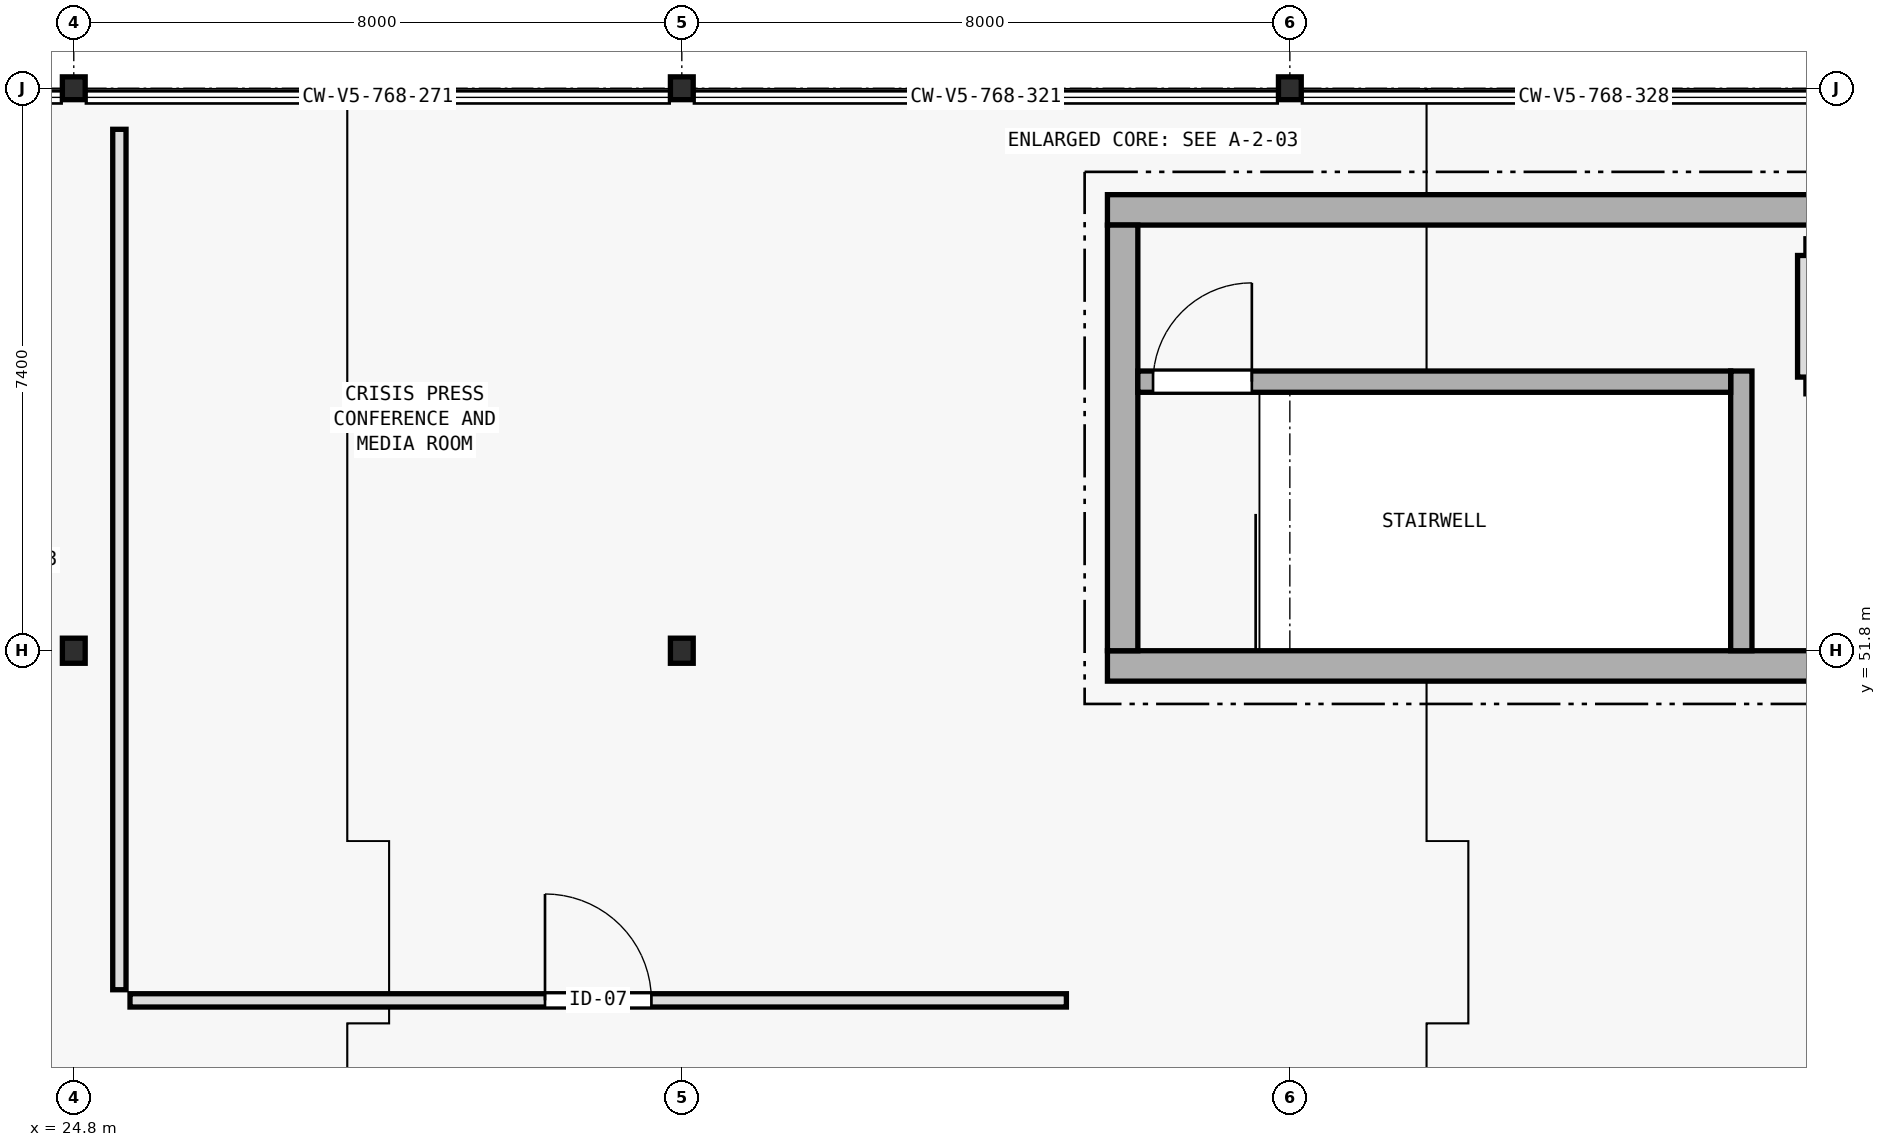
"""IFC4 building model, lengths in metres.
Left out: names, types, materials, properties, quantities, classifications, styles, units other than length and angle.
Written with IfcOpenShell. Run it as: python <this file> out.ifc"""

import sys

from ifc_helpers import new_model, si_unit, direction, frame, frame_2d, origin, origin_2d, place, context, subcontext, project, spatial, rectangle, i_section, extrude, element, fill, save


model = new_model("IFC4")
c1 = context("Model", 3, precision=1e-05, world=origin(), true_north=direction((0.0, 1.0)))
c2 = subcontext(c1, "Body", "Model", "MODEL_VIEW")
j1 = project(units=[si_unit("LENGTHUNIT", "METRE"), si_unit("PLANEANGLEUNIT", "RADIAN")], contexts=[c1])
p1 = place(None, origin())
s1 = spatial("IfcSite", under=j1, at=p1, CompositionType="ELEMENT")
p2 = place(p1, origin())
s2 = spatial("IfcBuilding", under=s1, at=p2, CompositionType="ELEMENT")
p3 = place(p2, frame((0.0, 0.0, 31.1)))
s3 = spatial("IfcBuildingStorey", under=s2, at=p3, CompositionType="ELEMENT", Elevation=31.1)
p4 = place(p3, frame((38.4, 51.6, 0.0), z_axis=(0.0, 0.0, 1.0), x_axis=(1.0, 0.0, 0.0)))
e1 = element("IfcWall", 1, at=p4, inside=s3, PredefinedType="SHEAR", context=c2, shape_type="SweptSolid", body=[
    extrude(rectangle(XDim=15.2, YDim=0.4, at=frame_2d((7.6, 0.0))), origin(), (0.0, 0.0, 1.0), 3.895),
])
p5 = place(p4, frame((10.25, 0.0, 0.0)))
e2 = element("IfcOpeningElement", 2, at=p5, cuts=e1, PredefinedType="OPENING", context=c2, shape_type="SweptSolid", body=[
    extrude(rectangle(XDim=1.3, YDim=2.2, at=frame_2d((0.65, 1.1))), frame((0.0, 0.21, 0.0), z_axis=(0.0, -1.0, 0.0), x_axis=(1.0, 0.0, 0.0)), (0.0, 0.0, 1.0), 0.42),
])
p6 = place(p3, frame((38.4, 57.6, 0.0), z_axis=(0.0, 0.0, 1.0), x_axis=(1.0, 0.0, 0.0)))
e3 = element("IfcWall", 3, at=p6, inside=s3, PredefinedType="SHEAR", context=c2, shape_type="SweptSolid", body=[
    extrude(rectangle(XDim=15.2, YDim=0.4, at=frame_2d((7.6, 0.0))), origin(), (0.0, 0.0, 1.0), 3.895),
])
p7 = place(p3, frame((38.6, 51.8, 0.0), z_axis=(0.0, 0.0, 1.0), x_axis=(0.0, 1.0, 0.0)))
e4 = element("IfcWall", 4, at=p7, inside=s3, PredefinedType="SHEAR", context=c2, shape_type="SweptSolid", body=[
    extrude(rectangle(XDim=5.6, YDim=0.4, at=frame_2d((2.8, 0.0))), origin(), (0.0, 0.0, 1.0), 3.895),
])
p8 = place(p3, frame((46.74, 51.8, 0.0), z_axis=(0.0, 0.0, 1.0), x_axis=(0.0, 1.0, 0.0)))
e5 = element("IfcWall", 5, at=p8, inside=s3, PredefinedType="SHEAR", context=c2, shape_type="SweptSolid", body=[
    extrude(rectangle(XDim=3.68, YDim=0.28, at=frame_2d((1.84, 0.0))), origin(), (0.0, 0.0, 1.0), 3.895),
])
p9 = place(p3, frame((38.8, 55.34, 0.0), z_axis=(0.0, 0.0, 1.0), x_axis=(1.0, 0.0, 0.0)))
e6 = element("IfcWall", 6, at=p9, inside=s3, PredefinedType="SHEAR", context=c2, shape_type="SweptSolid", body=[
    extrude(rectangle(XDim=7.8, YDim=0.28, at=frame_2d((3.9, 0.0))), origin(), (0.0, 0.0, 1.0), 3.895),
])
p10 = place(p9, frame((0.2, 0.0, 0.0)))
e7 = element("IfcOpeningElement", 7, at=p10, cuts=e6, PredefinedType="OPENING", context=c2, shape_type="SweptSolid", body=[
    extrude(rectangle(XDim=1.3, YDim=2.2, at=frame_2d((0.65, 1.1))), frame((0.0, 0.15, 0.0), z_axis=(0.0, -1.0, 0.0), x_axis=(1.0, 0.0, 0.0)), (0.0, 0.0, 1.0), 0.3),
])
p11 = place(p3, frame((24.8, 51.8, 0.0), z_axis=(0.0, 0.0, 1.0), x_axis=(1.0, 0.0, 0.0)))
e8 = element("IfcColumn", 8, at=p11, inside=s3, PredefinedType="COLUMN", context=c2, shape_type="SweptSolid", body=[
    extrude(i_section(OverallWidth=0.3, OverallDepth=0.33, WebThickness=0.01, FlangeThickness=0.017, FilletRadius=0.027, at=origin_2d()), origin(), (0.0, 0.0, 1.0), 3.9),
])
p12 = place(p3, frame((24.8, 59.2, 0.0), z_axis=(0.0, 0.0, 1.0), x_axis=(1.0, 0.0, 0.0)))
e9 = element("IfcColumn", 9, at=p12, inside=s3, PredefinedType="COLUMN", context=c2, shape_type="SweptSolid", body=[
    extrude(i_section(OverallWidth=0.3, OverallDepth=0.3, WebThickness=0.011, FlangeThickness=0.019, FilletRadius=0.027, at=origin_2d()), origin(), (0.0, 0.0, 1.0), 3.9),
])
p13 = place(p3, frame((32.8, 51.8, 0.0), z_axis=(0.0, 0.0, 1.0), x_axis=(1.0, 0.0, 0.0)))
e10 = element("IfcColumn", 10, at=p13, inside=s3, PredefinedType="COLUMN", context=c2, shape_type="SweptSolid", body=[
    extrude(i_section(OverallWidth=0.3, OverallDepth=0.33, WebThickness=0.01, FlangeThickness=0.017, FilletRadius=0.027, at=origin_2d()), origin(), (0.0, 0.0, 1.0), 3.9),
])
for number, where, z_axis, x_axis in (
    (11, (32.8, 59.2, 0.0), (0.0, 0.0, 1.0), (1.0, 0.0, 0.0)),
    (12, (40.8, 59.2, 0.0), (0.0, 0.0, 1.0), (1.0, 0.0, 0.0)),
):
    element("IfcColumn", number, at=place(p3, frame(where, z_axis=z_axis, x_axis=x_axis)), inside=s3, PredefinedType="COLUMN", context=c2, shape_type="SweptSolid", body=[
        extrude(i_section(OverallWidth=0.3, OverallDepth=0.3, WebThickness=0.011, FlangeThickness=0.019, FilletRadius=0.027, at=origin_2d()), origin(), (0.0, 0.0, 1.0), 3.9),
    ])
p14 = place(p3, frame((47.59, 55.29, 0.0), z_axis=(0.0, 0.0, 1.0), x_axis=(1.0, 0.0, 0.0)))
e13 = element("IfcWall", 13, at=p14, inside=s3, PredefinedType="PLUMBINGWALL", context=c2, shape_type="SweptSolid", body=[
    extrude(rectangle(XDim=1.62, YDim=0.22, at=frame_2d((0.81, 0.0))), origin(), (0.0, 0.0, 1.0), 3.62),
])
p15 = place(p14, frame((0.31, 0.0, 0.0)))
e14 = element("IfcOpeningElement", 14, at=p15, cuts=e13, PredefinedType="OPENING", context=c2, shape_type="SweptSolid", body=[
    extrude(rectangle(XDim=1.0, YDim=2.2, at=frame_2d((0.5, 1.1))), frame((0.0, 0.12, 0.0), z_axis=(0.0, -1.0, 0.0), x_axis=(1.0, 0.0, 0.0)), (0.0, 0.0, 1.0), 0.24),
])
p16 = place(p3, frame((47.59, 57.11, 0.0), z_axis=(0.0, 0.0, 1.0), x_axis=(1.0, 0.0, 0.0)))
e15 = element("IfcWall", 15, at=p16, inside=s3, PredefinedType="PLUMBINGWALL", context=c2, shape_type="SweptSolid", body=[
    extrude(rectangle(XDim=1.62, YDim=0.22, at=frame_2d((0.81, 0.0))), origin(), (0.0, 0.0, 1.0), 3.62),
])
p17 = place(p3, frame((47.59, 55.4, 0.0), z_axis=(0.0, 0.0, 1.0), x_axis=(0.0, 1.0, 0.0)))
e16 = element("IfcWall", 16, at=p17, inside=s3, PredefinedType="PLUMBINGWALL", context=c2, shape_type="SweptSolid", body=[
    extrude(rectangle(XDim=1.6, YDim=0.22, at=frame_2d((0.8, 0.0))), origin(), (0.0, 0.0, 1.0), 3.62),
])
p18 = place(p3, frame((25.54, 47.2, 0.0), z_axis=(0.0, 0.0, 1.0), x_axis=(1.0, 0.0, 0.0)))
e17 = element("IfcWall", 17, at=p18, inside=s3, PredefinedType="PARTITIONING", context=c2, shape_type="SweptSolid", body=[
    extrude(rectangle(XDim=12.32, YDim=0.175, at=frame_2d((6.16, 0.0))), origin(), (0.0, 0.0, 1.0), 3.2),
])
p19 = place(p18, frame((5.46, 0.0, 0.0)))
e18 = element("IfcOpeningElement", 18, at=p19, cuts=e17, PredefinedType="OPENING", context=c2, shape_type="SweptSolid", body=[
    extrude(rectangle(XDim=1.4, YDim=2.2, at=frame_2d((0.7, 1.1))), frame((0.0, 0.098, 0.0), z_axis=(0.0, -1.0, 0.0), x_axis=(1.0, 0.0, 0.0)), (0.0, 0.0, 1.0), 0.195),
])
p20 = place(p3, frame((25.4, 47.34, 0.0), z_axis=(0.0, 0.0, 1.0), x_axis=(0.0, 1.0, 0.0)))
e19 = element("IfcWall", 19, at=p20, inside=s3, PredefinedType="PARTITIONING", context=c2, shape_type="SweptSolid", body=[
    extrude(rectangle(XDim=11.32, YDim=0.175, at=frame_2d((5.66, 0.0))), origin(), (0.0, 0.0, 1.0), 3.2),
])
p21 = place(p2, frame((0.0, 0.0, 35.0)))
p22 = place(p21, frame((0.0, 0.0, -0.28)))
p23 = place(p22, frame((48.0, 48.0, 0.23)))
e20 = element("IfcWindow", 20, at=p23, inside=s3, PartitioningType="SINGLE_PANEL", PredefinedType="SKYLIGHT", context=c2, shape_type="SweptSolid", body=[
    extrude(rectangle(XDim=2.6, YDim=4.0, at=origin_2d()), origin(), (0.0, 0.0, 1.0), 0.05),
])
p24 = place(p10, origin())
e21 = element("IfcDoor", 21, at=p24, inside=s3, OperationType="SINGLE_SWING_RIGHT", PredefinedType="DOOR", context=c2, shape_type="SweptSolid", body=[
    extrude(rectangle(XDim=1.3, YDim=2.2, at=frame_2d((0.65, 1.1))), frame((0.0, 0.025, 0.0), z_axis=(0.0, -1.0, 0.0), x_axis=(1.0, 0.0, 0.0)), (0.0, 0.0, 1.0), 0.05),
])
fill(e7, e21)
p25 = place(p19, origin())
e22 = element("IfcDoor", 22, at=p25, inside=s3, OperationType="SINGLE_SWING_LEFT", PredefinedType="DOOR", context=c2, shape_type="SweptSolid", body=[
    extrude(rectangle(XDim=1.4, YDim=2.2, at=frame_2d((0.7, 1.1))), frame((0.0, 0.025, 0.0), z_axis=(0.0, -1.0, 0.0), x_axis=(1.0, 0.0, 0.0)), (0.0, 0.0, 1.0), 0.05),
])
fill(e18, e22)
save(model, sys.argv[1])
